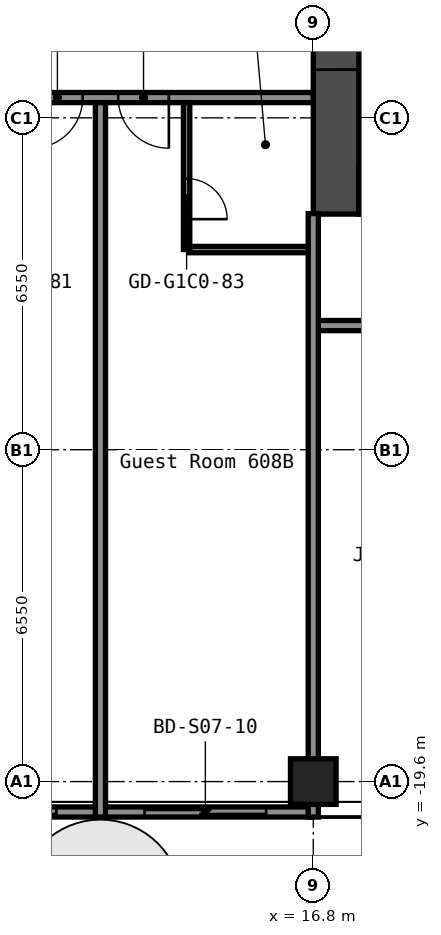
"""IFC4 building model, lengths in metres.
Left out: names, types, materials, properties, quantities, classifications, styles, units other than length and angle.
Written with IfcOpenShell. Run it as: python <this file> out.ifc"""

import sys

from ifc_helpers import new_model, si_unit, direction, frame, frame_2d, origin, origin_2d, place, context, subcontext, project, spatial, rectangle, hollow_rectangle, extrude, element, fill, save


model = new_model("IFC4")
c1 = context("Model", 3, precision=1e-05, world=origin(), true_north=direction((0.0, 1.0)))
c2 = subcontext(c1, "Body", "Model", "MODEL_VIEW")
j1 = project(units=[si_unit("LENGTHUNIT", "METRE"), si_unit("PLANEANGLEUNIT", "RADIAN")], contexts=[c1])
p1 = place(None, origin())
s1 = spatial("IfcSite", under=j1, at=p1, CompositionType="ELEMENT")
p2 = place(p1, origin())
s2 = spatial("IfcBuilding", under=s1, at=p2, CompositionType="ELEMENT")
p3 = place(p2, frame((0.0, 0.0, 26.2)))
s3 = spatial("IfcBuildingStorey", under=s2, at=p3, CompositionType="ELEMENT", Elevation=26.2)
p4 = place(p3, frame((16.8, -19.6, 0.0), z_axis=(0.0, 0.0, 1.0), x_axis=(1.0, 0.0, 0.0)))
e1 = element("IfcColumn", 1, at=p4, inside=s3, PredefinedType="COLUMN", context=c2, shape_type="SweptSolid", body=[
    extrude(hollow_rectangle(XDim=0.9, YDim=0.9, WallThickness=0.036, at=origin_2d()), origin(), (0.0, 0.0, 1.0), 2.8),
])
p5 = place(p3, frame((17.25, -8.4, 0.0), z_axis=(0.0, 0.0, 1.0), x_axis=(0.0, 1.0, 0.0)))
e2 = element("IfcWall", 2, at=p5, inside=s3, PredefinedType="SHEAR", context=c2, shape_type="SweptSolid", body=[
    extrude(rectangle(XDim=16.8, YDim=0.9, at=frame_2d((8.4, 0.0))), origin(), (0.0, 0.0, 1.0), 2.8),
])
p6 = place(p5, frame((12.75, 0.0, 0.0)))
e3 = element("IfcOpeningElement", 3, at=p6, cuts=e2, PredefinedType="OPENING", context=c2, shape_type="SweptSolid", body=[
    extrude(rectangle(XDim=1.2, YDim=2.1, at=frame_2d((0.6, 1.05))), frame((0.0, 0.46, 0.0), z_axis=(0.0, -1.0, 0.0), x_axis=(1.0, 0.0, 0.0)), (0.0, 0.0, 1.0), 0.92),
])
p7 = place(p5, frame((2.85, 0.0, 0.0)))
e4 = element("IfcOpeningElement", 4, at=p7, cuts=e2, PredefinedType="OPENING", context=c2, shape_type="SweptSolid", body=[
    extrude(rectangle(XDim=1.2, YDim=2.1, at=frame_2d((0.6, 1.05))), frame((0.0, 0.46, 0.0), z_axis=(0.0, -1.0, 0.0), x_axis=(1.0, 0.0, 0.0)), (0.0, 0.0, 1.0), 0.92),
])
p8 = place(p3, frame((17.7, -7.95, 0.0), z_axis=(0.0, 0.0, 1.0), x_axis=(1.0, 0.0, 0.0)))
e5 = element("IfcWall", 5, at=p8, inside=s3, PredefinedType="SHEAR", context=c2, shape_type="SweptSolid", body=[
    extrude(rectangle(XDim=15.0, YDim=0.9, at=frame_2d((7.5, 0.0))), origin(), (0.0, 0.0, 1.0), 2.8),
])
p9 = place(p8, frame((2.55, 0.0, 0.0)))
e6 = element("IfcOpeningElement", 6, at=p9, cuts=e5, PredefinedType="OPENING", context=c2, shape_type="SweptSolid", body=[
    extrude(rectangle(XDim=1.0, YDim=2.1, at=frame_2d((0.5, 1.05))), frame((0.0, 0.46, 0.0), z_axis=(0.0, -1.0, 0.0), x_axis=(1.0, 0.0, 0.0)), (0.0, 0.0, 1.0), 0.92),
])
p10 = place(p3, frame((16.8, -10.6, 0.0), z_axis=(0.0, 0.0, 1.0), x_axis=(1.0, 0.0, 0.0)))
e7 = element("IfcWall", 7, at=p10, inside=s3, PredefinedType="PARTITIONING", context=c2, shape_type="SweptSolid", body=[
    extrude(rectangle(XDim=34.3, YDim=0.2, at=frame_2d((17.15, 0.0))), origin(), (0.0, 0.0, 1.0), 2.8),
])
p11 = place(p10, frame((2.0, 0.0, 0.0)))
e8 = element("IfcOpeningElement", 8, at=p11, cuts=e7, PredefinedType="OPENING", context=c2, shape_type="SweptSolid", body=[
    extrude(rectangle(XDim=1.0, YDim=2.1, at=frame_2d((0.5, 1.05))), frame((0.0, 0.11, 0.0), z_axis=(0.0, -1.0, 0.0), x_axis=(1.0, 0.0, 0.0)), (0.0, 0.0, 1.0), 0.22),
])
p12 = place(p10, frame((11.25, 0.0, 0.0)))
e9 = element("IfcOpeningElement", 9, at=p12, cuts=e7, PredefinedType="OPENING", context=c2, shape_type="SweptSolid", body=[
    extrude(rectangle(XDim=1.0, YDim=2.1, at=frame_2d((0.5, 1.05))), frame((0.0, 0.11, 0.0), z_axis=(0.0, -1.0, 0.0), x_axis=(1.0, 0.0, 0.0)), (0.0, 0.0, 1.0), 0.22),
])
p13 = place(p10, frame((12.95, 0.0, 0.0)))
e10 = element("IfcOpeningElement", 10, at=p13, cuts=e7, PredefinedType="OPENING", context=c2, shape_type="SweptSolid", body=[
    extrude(rectangle(XDim=1.0, YDim=2.1, at=frame_2d((0.5, 1.05))), frame((0.0, 0.11, 0.0), z_axis=(0.0, -1.0, 0.0), x_axis=(1.0, 0.0, 0.0)), (0.0, 0.0, 1.0), 0.22),
])
p14 = place(p10, frame((18.7, 0.0, 0.0)))
e11 = element("IfcOpeningElement", 11, at=p14, cuts=e7, PredefinedType="OPENING", context=c2, shape_type="SweptSolid", body=[
    extrude(rectangle(XDim=1.0, YDim=2.1, at=frame_2d((0.5, 1.05))), frame((0.0, 0.11, 0.0), z_axis=(0.0, -1.0, 0.0), x_axis=(1.0, 0.0, 0.0)), (0.0, 0.0, 1.0), 0.22),
])
p15 = place(p10, frame((28.15, 0.0, 0.0)))
e12 = element("IfcOpeningElement", 12, at=p15, cuts=e7, PredefinedType="OPENING", context=c2, shape_type="SweptSolid", body=[
    extrude(rectangle(XDim=1.0, YDim=2.1, at=frame_2d((0.5, 1.05))), frame((0.0, 0.11, 0.0), z_axis=(0.0, -1.0, 0.0), x_axis=(1.0, 0.0, 0.0)), (0.0, 0.0, 1.0), 0.22),
])
p16 = place(p10, frame((30.05, 0.0, 0.0)))
e13 = element("IfcOpeningElement", 13, at=p16, cuts=e7, PredefinedType="OPENING", context=c2, shape_type="SweptSolid", body=[
    extrude(rectangle(XDim=1.0, YDim=2.1, at=frame_2d((0.5, 1.05))), frame((0.0, 0.11, 0.0), z_axis=(0.0, -1.0, 0.0), x_axis=(1.0, 0.0, 0.0)), (0.0, 0.0, 1.0), 0.22),
])
p17 = place(p3, frame((14.363, -9.1, 0.0), z_axis=(0.0, 0.0, 1.0), x_axis=(1.0, 0.0, 0.0)))
e14 = element("IfcWall", 14, at=p17, inside=s3, PredefinedType="PARTITIONING", context=c2, shape_type="SweptSolid", body=[
    extrude(rectangle(XDim=2.337, YDim=0.125, at=frame_2d((1.169, 0.0))), origin(), (0.0, 0.0, 1.0), 2.8),
])
p18 = place(p3, frame((-16.8, -6.1, 0.0), z_axis=(0.0, 0.0, 1.0), x_axis=(1.0, 0.0, 0.0)))
e15 = element("IfcWall", 15, at=p18, inside=s3, PredefinedType="PARTITIONING", context=c2, shape_type="SweptSolid", body=[
    extrude(rectangle(XDim=33.6, YDim=0.2, at=frame_2d((16.8, 0.0))), origin(), (0.0, 0.0, 1.0), 2.8),
])
p19 = place(p18, frame((2.0, 0.0, 0.0)))
e16 = element("IfcOpeningElement", 16, at=p19, cuts=e15, PredefinedType="OPENING", context=c2, shape_type="SweptSolid", body=[
    extrude(rectangle(XDim=1.0, YDim=2.1, at=frame_2d((0.5, 1.05))), frame((0.0, 0.11, 0.0), z_axis=(0.0, -1.0, 0.0), x_axis=(1.0, 0.0, 0.0)), (0.0, 0.0, 1.0), 0.22),
])
p20 = place(p18, frame((11.25, 0.0, 0.0)))
e17 = element("IfcOpeningElement", 17, at=p20, cuts=e15, PredefinedType="OPENING", context=c2, shape_type="SweptSolid", body=[
    extrude(rectangle(XDim=1.0, YDim=2.1, at=frame_2d((0.5, 1.05))), frame((0.0, 0.11, 0.0), z_axis=(0.0, -1.0, 0.0), x_axis=(1.0, 0.0, 0.0)), (0.0, 0.0, 1.0), 0.22),
])
p21 = place(p18, frame((12.95, 0.0, 0.0)))
e18 = element("IfcOpeningElement", 18, at=p21, cuts=e15, PredefinedType="OPENING", context=c2, shape_type="SweptSolid", body=[
    extrude(rectangle(XDim=1.0, YDim=2.1, at=frame_2d((0.5, 1.05))), frame((0.0, 0.11, 0.0), z_axis=(0.0, -1.0, 0.0), x_axis=(1.0, 0.0, 0.0)), (0.0, 0.0, 1.0), 0.22),
])
p22 = place(p18, frame((18.28, 0.0, 0.0)))
e19 = element("IfcOpeningElement", 19, at=p22, cuts=e15, PredefinedType="OPENING", context=c2, shape_type="SweptSolid", body=[
    extrude(rectangle(XDim=0.9, YDim=2.1, at=frame_2d((0.45, 1.05))), frame((0.0, 0.11, 0.0), z_axis=(0.0, -1.0, 0.0), x_axis=(1.0, 0.0, 0.0)), (0.0, 0.0, 1.0), 0.22),
])
p23 = place(p18, frame((22.48, 0.0, 0.0)))
e20 = element("IfcOpeningElement", 20, at=p23, cuts=e15, PredefinedType="OPENING", context=c2, shape_type="SweptSolid", body=[
    extrude(rectangle(XDim=0.9, YDim=2.1, at=frame_2d((0.45, 1.05))), frame((0.0, 0.11, 0.0), z_axis=(0.0, -1.0, 0.0), x_axis=(1.0, 0.0, 0.0)), (0.0, 0.0, 1.0), 0.22),
])
p24 = place(p18, frame((28.05, 0.0, 0.0)))
e21 = element("IfcOpeningElement", 21, at=p24, cuts=e15, PredefinedType="OPENING", context=c2, shape_type="SweptSolid", body=[
    extrude(rectangle(XDim=1.0, YDim=2.1, at=frame_2d((0.5, 1.05))), frame((0.0, 0.11, 0.0), z_axis=(0.0, -1.0, 0.0), x_axis=(1.0, 0.0, 0.0)), (0.0, 0.0, 1.0), 0.22),
])
p25 = place(p18, frame((29.75, 0.0, 0.0)))
e22 = element("IfcOpeningElement", 22, at=p25, cuts=e15, PredefinedType="OPENING", context=c2, shape_type="SweptSolid", body=[
    extrude(rectangle(XDim=1.0, YDim=2.1, at=frame_2d((0.5, 1.05))), frame((0.0, 0.11, 0.0), z_axis=(0.0, -1.0, 0.0), x_axis=(1.0, 0.0, 0.0)), (0.0, 0.0, 1.0), 0.22),
])
p26 = place(p3, frame((12.6, -20.3, 0.0), z_axis=(0.0, 0.0, 1.0), x_axis=(0.0, 1.0, 0.0)))
e23 = element("IfcWall", 23, at=p26, inside=s3, PredefinedType="PARTITIONING", context=c2, shape_type="SweptSolid", body=[
    extrude(rectangle(XDim=14.1, YDim=0.2, at=frame_2d((7.05, 0.0))), origin(), (0.0, 0.0, 1.0), 2.8),
])
p27 = place(p3, frame((14.3, -9.1, 0.0), z_axis=(0.0, 0.0, 1.0), x_axis=(0.0, 1.0, 0.0)))
e24 = element("IfcWall", 24, at=p27, inside=s3, PredefinedType="PARTITIONING", context=c2, shape_type="SweptSolid", body=[
    extrude(rectangle(XDim=2.9, YDim=0.125, at=frame_2d((1.45, 0.0))), origin(), (0.0, 0.0, 1.0), 2.8),
])
p28 = place(p27, frame((0.6, 0.0, 0.0)))
e25 = element("IfcOpeningElement", 25, at=p28, cuts=e24, PredefinedType="OPENING", context=c2, shape_type="SweptSolid", body=[
    extrude(rectangle(XDim=0.8, YDim=2.1, at=frame_2d((0.4, 1.05))), frame((0.0, 0.073, 0.0), z_axis=(0.0, -1.0, 0.0), x_axis=(1.0, 0.0, 0.0)), (0.0, 0.0, 1.0), 0.145),
])
p29 = place(p3, frame((16.8, -20.3, 0.0), z_axis=(0.0, 0.0, 1.0), x_axis=(0.0, 1.0, 0.0)))
e26 = element("IfcWall", 26, at=p29, inside=s3, PredefinedType="PARTITIONING", context=c2, shape_type="SweptSolid", body=[
    extrude(rectangle(XDim=11.91, YDim=0.2, at=frame_2d((5.955, 0.0))), origin(), (0.0, 0.0, 1.0), 2.8),
])
p30 = place(p3, frame((8.42, -20.2, 0.0), z_axis=(0.0, 0.0, 1.0), x_axis=(1.0, 0.0, 0.0)))
p31 = place(p30, frame((0.91, 0.0, 0.0)))
p32 = place(p31, frame((2.4, 0.0, 0.0), z_axis=(0.0, 0.0, 1.0), x_axis=(-1.0, 0.0, 0.0)))
e27 = element("IfcDoor", 27, at=p32, inside=s3, OperationType="SLIDING_TO_LEFT", PredefinedType="DOOR", context=c2, shape_type="SweptSolid", body=[
    extrude(rectangle(XDim=2.4, YDim=2.2, at=frame_2d((1.2, 1.1))), frame((0.0, 0.025, 0.0), z_axis=(0.0, -1.0, 0.0), x_axis=(1.0, 0.0, 0.0)), (0.0, 0.0, 1.0), 0.05),
])
p33 = place(p3, frame((12.56, -20.2, 0.0), z_axis=(0.0, 0.0, 1.0), x_axis=(1.0, 0.0, 0.0)))
p34 = place(p33, frame((0.91, 0.0, 0.0)))
p35 = place(p34, frame((2.4, 0.0, 0.0), z_axis=(0.0, 0.0, 1.0), x_axis=(-1.0, 0.0, 0.0)))
e28 = element("IfcDoor", 28, at=p35, inside=s3, OperationType="SLIDING_TO_LEFT", PredefinedType="DOOR", context=c2, shape_type="SweptSolid", body=[
    extrude(rectangle(XDim=2.4, YDim=2.2, at=frame_2d((1.2, 1.1))), frame((0.0, 0.025, 0.0), z_axis=(0.0, -1.0, 0.0), x_axis=(1.0, 0.0, 0.0)), (0.0, 0.0, 1.0), 0.05),
])
p36 = place(p7, origin())
e29 = element("IfcDoor", 29, at=p36, inside=s3, OperationType="DOUBLE_DOOR_SINGLE_SWING", PredefinedType="DOOR", context=c2, shape_type="SweptSolid", body=[
    extrude(rectangle(XDim=1.2, YDim=2.1, at=frame_2d((0.6, 1.05))), frame((0.0, 0.025, 0.0), z_axis=(0.0, -1.0, 0.0), x_axis=(1.0, 0.0, 0.0)), (0.0, 0.0, 1.0), 0.05),
])
fill(e4, e29)
p37 = place(p24, origin())
e30 = element("IfcDoor", 30, at=p37, inside=s3, OperationType="SINGLE_SWING_LEFT", PredefinedType="DOOR", context=c2, shape_type="SweptSolid", body=[
    extrude(rectangle(XDim=1.0, YDim=2.1, at=frame_2d((0.5, 1.05))), frame((0.0, 0.025, 0.0), z_axis=(0.0, -1.0, 0.0), x_axis=(1.0, 0.0, 0.0)), (0.0, 0.0, 1.0), 0.05),
])
fill(e21, e30)
p38 = place(p25, origin())
e31 = element("IfcDoor", 31, at=p38, inside=s3, OperationType="SINGLE_SWING_RIGHT", PredefinedType="DOOR", context=c2, shape_type="SweptSolid", body=[
    extrude(rectangle(XDim=1.0, YDim=2.1, at=frame_2d((0.5, 1.05))), frame((0.0, 0.025, 0.0), z_axis=(0.0, -1.0, 0.0), x_axis=(1.0, 0.0, 0.0)), (0.0, 0.0, 1.0), 0.05),
])
fill(e22, e31)
p39 = place(p28, origin())
e32 = element("IfcDoor", 32, at=p39, inside=s3, OperationType="SINGLE_SWING_LEFT", PredefinedType="DOOR", context=c2, shape_type="SweptSolid", body=[
    extrude(rectangle(XDim=0.8, YDim=2.1, at=frame_2d((0.4, 1.05))), frame((0.0, 0.025, 0.0), z_axis=(0.0, -1.0, 0.0), x_axis=(1.0, 0.0, 0.0)), (0.0, 0.0, 1.0), 0.05),
])
fill(e25, e32)
save(model, sys.argv[1])
